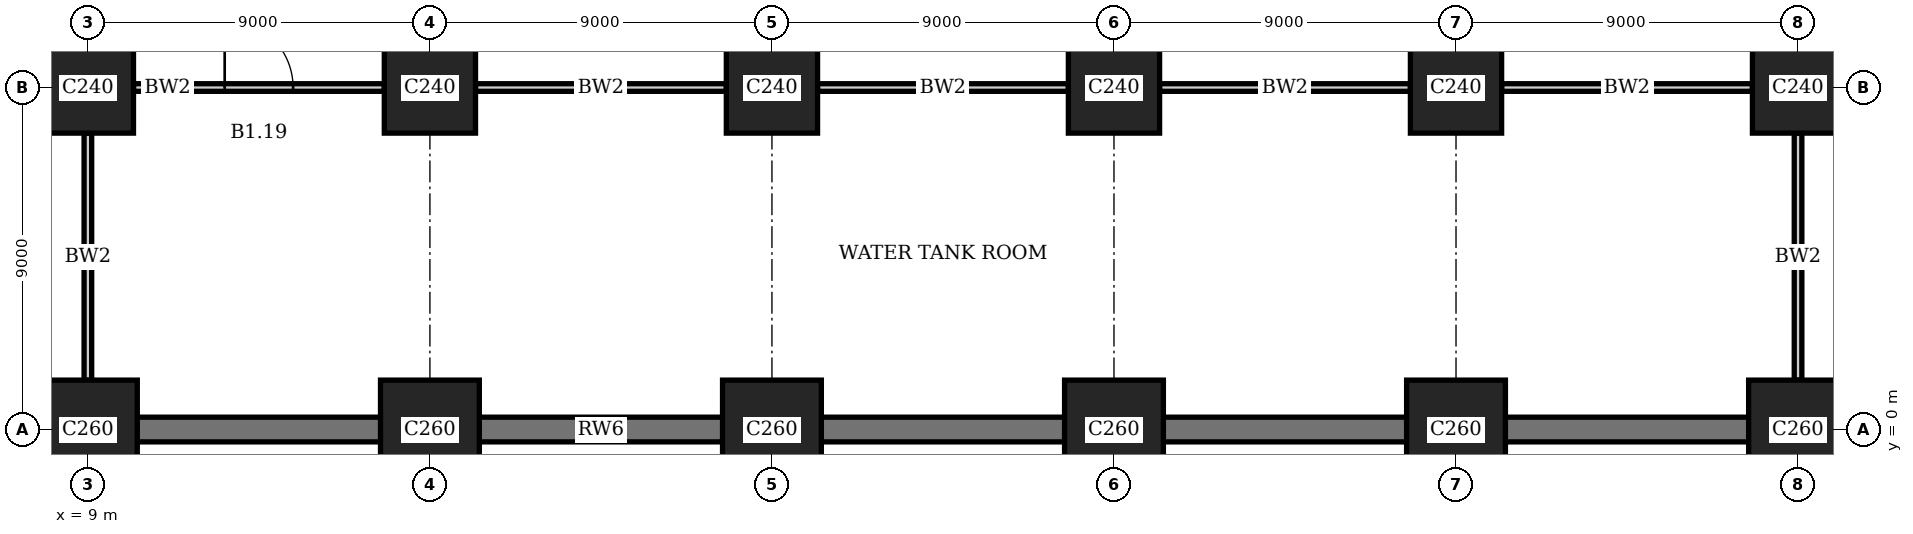
"""IFC4 building model, lengths in metres.
Left out: names, types, materials, properties, quantities, classifications, styles, units other than length and angle.
Written with IfcOpenShell. Run it as: python <this file> out.ifc"""

import sys

from ifc_helpers import new_model, si_unit, direction, frame, frame_2d, origin, origin_2d, place, context, subcontext, project, spatial, rectangle, extrude, element, fill, save


model = new_model("IFC4")
c1 = context("Model", 3, precision=1e-05, world=origin(), true_north=direction((0.0, 1.0)))
c2 = subcontext(c1, "Body", "Model", "MODEL_VIEW")
j1 = project(units=[si_unit("LENGTHUNIT", "METRE"), si_unit("PLANEANGLEUNIT", "RADIAN")], contexts=[c1])
p1 = place(None, origin())
s1 = spatial("IfcSite", under=j1, at=p1, CompositionType="ELEMENT")
p2 = place(p1, origin())
s2 = spatial("IfcBuilding", under=s1, at=p2, CompositionType="ELEMENT")
p3 = place(p2, frame((0.0, 0.0, -5.0)))
s3 = spatial("IfcBuildingStorey", under=s2, at=p3, CompositionType="ELEMENT", Elevation=-5.0)
p4 = place(p3, frame((9.0, 0.0, -0.45), z_axis=(0.0, 0.0, 1.0), x_axis=(1.0, 0.0, 0.0)))
e1 = element("IfcColumn", 1, at=p4, inside=s3, PredefinedType="COLUMN", context=c2, shape_type="SweptSolid", body=[
    extrude(rectangle(XDim=2.6, YDim=2.6, at=origin_2d()), origin(), (0.0, 0.0, 1.0), 5.45),
])
p5 = place(p3, frame((9.0, 9.0, -0.45), z_axis=(0.0, 0.0, 1.0), x_axis=(1.0, 0.0, 0.0)))
e2 = element("IfcColumn", 2, at=p5, inside=s3, PredefinedType="COLUMN", context=c2, shape_type="SweptSolid", body=[
    extrude(rectangle(XDim=2.4, YDim=2.4, at=origin_2d()), origin(), (0.0, 0.0, 1.0), 5.45),
])
p6 = place(p3, frame((18.0, 0.0, -0.45), z_axis=(0.0, 0.0, 1.0), x_axis=(1.0, 0.0, 0.0)))
e3 = element("IfcColumn", 3, at=p6, inside=s3, PredefinedType="COLUMN", context=c2, shape_type="SweptSolid", body=[
    extrude(rectangle(XDim=2.6, YDim=2.6, at=origin_2d()), origin(), (0.0, 0.0, 1.0), 5.45),
])
p7 = place(p3, frame((18.0, 9.0, -0.45), z_axis=(0.0, 0.0, 1.0), x_axis=(1.0, 0.0, 0.0)))
e4 = element("IfcColumn", 4, at=p7, inside=s3, PredefinedType="COLUMN", context=c2, shape_type="SweptSolid", body=[
    extrude(rectangle(XDim=2.4, YDim=2.4, at=origin_2d()), origin(), (0.0, 0.0, 1.0), 5.45),
])
p8 = place(p3, frame((27.0, 0.0, -0.45), z_axis=(0.0, 0.0, 1.0), x_axis=(1.0, 0.0, 0.0)))
e5 = element("IfcColumn", 5, at=p8, inside=s3, PredefinedType="COLUMN", context=c2, shape_type="SweptSolid", body=[
    extrude(rectangle(XDim=2.6, YDim=2.6, at=origin_2d()), origin(), (0.0, 0.0, 1.0), 5.45),
])
p9 = place(p3, frame((27.0, 9.0, -0.45), z_axis=(0.0, 0.0, 1.0), x_axis=(1.0, 0.0, 0.0)))
e6 = element("IfcColumn", 6, at=p9, inside=s3, PredefinedType="COLUMN", context=c2, shape_type="SweptSolid", body=[
    extrude(rectangle(XDim=2.4, YDim=2.4, at=origin_2d()), origin(), (0.0, 0.0, 1.0), 5.45),
])
p10 = place(p3, frame((36.0, 0.0, -0.45), z_axis=(0.0, 0.0, 1.0), x_axis=(1.0, 0.0, 0.0)))
e7 = element("IfcColumn", 7, at=p10, inside=s3, PredefinedType="COLUMN", context=c2, shape_type="SweptSolid", body=[
    extrude(rectangle(XDim=2.6, YDim=2.6, at=origin_2d()), origin(), (0.0, 0.0, 1.0), 5.45),
])
p11 = place(p3, frame((36.0, 9.0, -0.45), z_axis=(0.0, 0.0, 1.0), x_axis=(1.0, 0.0, 0.0)))
e8 = element("IfcColumn", 8, at=p11, inside=s3, PredefinedType="COLUMN", context=c2, shape_type="SweptSolid", body=[
    extrude(rectangle(XDim=2.4, YDim=2.4, at=origin_2d()), origin(), (0.0, 0.0, 1.0), 5.45),
])
p12 = place(p3, frame((45.0, 0.0, -0.45), z_axis=(0.0, 0.0, 1.0), x_axis=(1.0, 0.0, 0.0)))
e9 = element("IfcColumn", 9, at=p12, inside=s3, PredefinedType="COLUMN", context=c2, shape_type="SweptSolid", body=[
    extrude(rectangle(XDim=2.6, YDim=2.6, at=origin_2d()), origin(), (0.0, 0.0, 1.0), 5.45),
])
p13 = place(p3, frame((45.0, 9.0, -0.45), z_axis=(0.0, 0.0, 1.0), x_axis=(1.0, 0.0, 0.0)))
e10 = element("IfcColumn", 10, at=p13, inside=s3, PredefinedType="COLUMN", context=c2, shape_type="SweptSolid", body=[
    extrude(rectangle(XDim=2.4, YDim=2.4, at=origin_2d()), origin(), (0.0, 0.0, 1.0), 5.45),
])
p14 = place(p3, frame((54.0, 0.0, -0.45), z_axis=(0.0, 0.0, 1.0), x_axis=(1.0, 0.0, 0.0)))
e11 = element("IfcColumn", 11, at=p14, inside=s3, PredefinedType="COLUMN", context=c2, shape_type="SweptSolid", body=[
    extrude(rectangle(XDim=2.6, YDim=2.6, at=origin_2d()), origin(), (0.0, 0.0, 1.0), 5.45),
])
p15 = place(p3, frame((54.0, 9.0, -0.45), z_axis=(0.0, 0.0, 1.0), x_axis=(1.0, 0.0, 0.0)))
e12 = element("IfcColumn", 12, at=p15, inside=s3, PredefinedType="COLUMN", context=c2, shape_type="SweptSolid", body=[
    extrude(rectangle(XDim=2.4, YDim=2.4, at=origin_2d()), origin(), (0.0, 0.0, 1.0), 5.45),
])
p16 = place(p3, frame((0.0, 0.0, -0.45), z_axis=(0.0, 0.0, 1.0), x_axis=(1.0, 0.0, 0.0)))
e13 = element("IfcWall", 13, at=p16, inside=s3, PredefinedType="SOLIDWALL", context=c2, shape_type="SweptSolid", body=[
    extrude(rectangle(XDim=63.0, YDim=0.65, at=frame_2d((31.5, 0.0))), origin(), (0.0, 0.0, 1.0), 5.45),
])
for number, where, z_axis, x_axis in (
    (14, (9.0, 1.3, 0.0), (0.0, 0.0, 1.0), (0.0, 1.0, 0.0)),
    (15, (54.0, 1.3, 0.0), (0.0, 0.0, 1.0), (0.0, 1.0, 0.0)),
):
    element("IfcWall", number, at=place(p3, frame(where, z_axis=z_axis, x_axis=x_axis)), inside=s3, PredefinedType="SOLIDWALL", context=c2, shape_type="SweptSolid", body=[
        extrude(rectangle(XDim=6.5, YDim=0.2, at=frame_2d((3.25, 0.0))), origin(), (0.0, 0.0, 1.0), 3.9),
    ])
p17 = place(p3, frame((10.2, 9.0, 0.0), z_axis=(0.0, 0.0, 1.0), x_axis=(1.0, 0.0, 0.0)))
e16 = element("IfcWall", 16, at=p17, inside=s3, PredefinedType="SOLIDWALL", context=c2, shape_type="SweptSolid", body=[
    extrude(rectangle(XDim=6.6, YDim=0.2, at=frame_2d((3.3, 0.0))), origin(), (0.0, 0.0, 1.0), 3.9),
])
p18 = place(p17, frame((2.4, 0.0, 0.0)))
e17 = element("IfcOpeningElement", 17, at=p18, cuts=e16, PredefinedType="OPENING", context=c2, shape_type="SweptSolid", body=[
    extrude(rectangle(XDim=1.8, YDim=2.4, at=frame_2d((0.9, 1.2))), frame((0.0, 0.11, 0.0), z_axis=(0.0, -1.0, 0.0), x_axis=(1.0, 0.0, 0.0)), (0.0, 0.0, 1.0), 0.22),
])
for number, where, z_axis, x_axis in (
    (18, (19.2, 9.0, 0.0), (0.0, 0.0, 1.0), (1.0, 0.0, 0.0)),
    (19, (28.2, 9.0, 0.0), (0.0, 0.0, 1.0), (1.0, 0.0, 0.0)),
    (20, (37.2, 9.0, 0.0), (0.0, 0.0, 1.0), (1.0, 0.0, 0.0)),
    (21, (46.2, 9.0, 0.0), (0.0, 0.0, 1.0), (1.0, 0.0, 0.0)),
):
    element("IfcWall", number, at=place(p3, frame(where, z_axis=z_axis, x_axis=x_axis)), inside=s3, PredefinedType="SOLIDWALL", context=c2, shape_type="SweptSolid", body=[
        extrude(rectangle(XDim=6.6, YDim=0.2, at=frame_2d((3.3, 0.0))), origin(), (0.0, 0.0, 1.0), 3.9),
    ])
p19 = place(p18, origin())
e22 = element("IfcDoor", 22, at=p19, inside=s3, OperationType="DOUBLE_DOOR_SINGLE_SWING", PredefinedType="DOOR", context=c2, shape_type="SweptSolid", body=[
    extrude(rectangle(XDim=1.8, YDim=2.4, at=frame_2d((0.9, 1.2))), frame((0.0, 0.025, 0.0), z_axis=(0.0, -1.0, 0.0), x_axis=(1.0, 0.0, 0.0)), (0.0, 0.0, 1.0), 0.05),
])
fill(e17, e22)
save(model, sys.argv[1])
